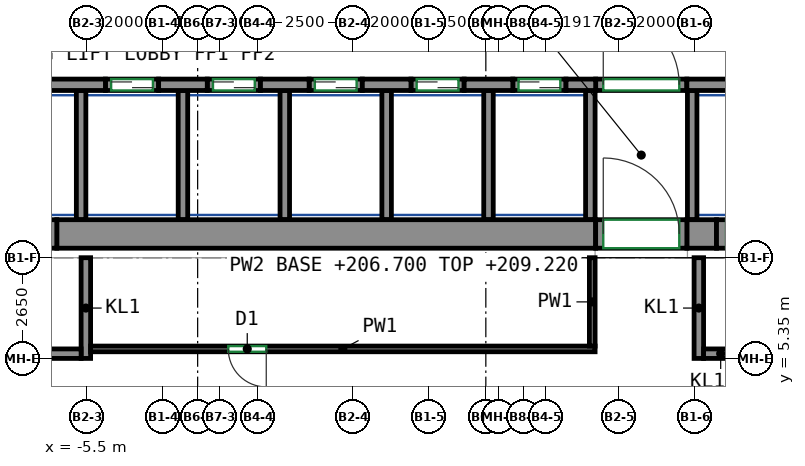
"""IFC4 building model, lengths in metres.
Left out: names, types, materials, properties, quantities, classifications, styles, units other than length and angle.
Written with IfcOpenShell. Run it as: python <this file> out.ifc"""

import sys

from ifc_helpers import new_model, si_unit, direction, frame, frame_2d, origin, place, context, subcontext, project, spatial, rectangle, extrude, source, transform, mapped, element, fill, save


model = new_model("IFC4")
c1 = context("Model", 3, precision=1e-05, world=origin(), true_north=direction((0.0, 1.0)))
c2 = subcontext(c1, "Body", "Model", "MODEL_VIEW")
j1 = project(units=[si_unit("LENGTHUNIT", "METRE"), si_unit("PLANEANGLEUNIT", "RADIAN")], contexts=[c1])
p1 = place(None, origin())
s1 = spatial("IfcSite", under=j1, at=p1, CompositionType="ELEMENT")
p2 = place(p1, origin())
s2 = spatial("IfcBuilding", under=s1, at=p2, CompositionType="ELEMENT")
p3 = place(p2, frame((0.0, 0.0, 206.7)))
s3 = spatial("IfcBuildingStorey", under=s2, at=p3, CompositionType="ELEMENT", Elevation=206.7)
m1 = source(origin(), c2, "Body", "SweptSolid", [
    extrude(rectangle(XDim=14.18, YDim=0.75, at=frame_2d((7.09, 0.0))), origin(), (0.0, 0.0, 1.0), 3.12),
])
p4 = place(p3, frame((-6.29, 8.625, 0.0), z_axis=(0.0, 0.0, 1.0), x_axis=(1.0, 0.0, 0.0)))
e1 = element("IfcWall", 1, at=p4, inside=s3, PredefinedType="SHEAR", context=c2, shape_type="MappedRepresentation", body=[
    mapped(m1, transform((0.0, 0.0, 0.0))),
])
m2 = source(origin(), c2, "Body", "SweptSolid", [
    extrude(rectangle(XDim=0.78, YDim=0.75, at=frame_2d((0.39, 0.0))), origin(), (0.0, 0.0, 1.0), 3.12),
])
p5 = place(p3, frame((10.29, 8.625, 0.0), z_axis=(0.0, 0.0, 1.0), x_axis=(1.0, 0.0, 0.0)))
e2 = element("IfcWall", 2, at=p5, inside=s3, PredefinedType="SHEAR", context=c2, shape_type="MappedRepresentation", body=[
    mapped(m2, transform((0.0, 0.0, 0.0))),
])
m3 = source(origin(), c2, "Body", "SweptSolid", [
    extrude(rectangle(XDim=6.0, YDim=0.3, at=frame_2d((3.0, 0.0))), origin(), (0.0, 0.0, 1.0), 3.12),
])
p6 = place(p3, frame((-11.01, 12.55, 0.0), z_axis=(0.0, 0.0, 1.0), x_axis=(1.0, 0.0, 0.0)))
e3 = element("IfcWall", 3, at=p6, inside=s3, PredefinedType="SHEAR", context=c2, shape_type="MappedRepresentation", body=[
    mapped(m3, transform((0.0, 0.0, 0.0))),
])
m4 = source(origin(), c2, "Body", "SweptSolid", [
    extrude(rectangle(XDim=1.28, YDim=0.3, at=frame_2d((0.64, 0.0))), origin(), (0.0, 0.0, 1.0), 3.12),
])
for number, where, z_axis, x_axis in (
    (4, (-3.61, 12.55, 0.0), (0.0, 0.0, 1.0), (1.0, 0.0, 0.0)),
    (5, (-0.93, 12.55, 0.0), (0.0, 0.0, 1.0), (1.0, 0.0, 0.0)),
    (6, (1.75, 12.55, 0.0), (0.0, 0.0, 1.0), (1.0, 0.0, 0.0)),
    (7, (4.43, 12.55, 0.0), (0.0, 0.0, 1.0), (1.0, 0.0, 0.0)),
):
    element("IfcWall", number, at=place(p3, frame(where, z_axis=z_axis, x_axis=x_axis)), inside=s3, PredefinedType="SHEAR", context=c2, shape_type="MappedRepresentation", body=[
        mapped(m4, transform((0.0, 0.0, 0.0))),
    ])
m5 = source(origin(), c2, "Body", "SweptSolid", [
    extrude(rectangle(XDim=0.78, YDim=0.3, at=frame_2d((0.39, 0.0))), origin(), (0.0, 0.0, 1.0), 3.12),
])
p7 = place(p3, frame((7.11, 12.55, 0.0), z_axis=(0.0, 0.0, 1.0), x_axis=(1.0, 0.0, 0.0)))
e8 = element("IfcWall", 8, at=p7, inside=s3, PredefinedType="SHEAR", context=c2, shape_type="MappedRepresentation", body=[
    mapped(m5, transform((0.0, 0.0, 0.0))),
])
m6 = source(origin(), c2, "Body", "SweptSolid", [
    extrude(rectangle(XDim=2.82, YDim=0.3, at=frame_2d((1.41, 0.0))), origin(), (0.0, 0.0, 1.0), 3.12),
])
p8 = place(p3, frame((10.29, 12.55, 0.0), z_axis=(0.0, 0.0, 1.0), x_axis=(1.0, 0.0, 0.0)))
e9 = element("IfcWall", 9, at=p8, inside=s3, PredefinedType="SHEAR", context=c2, shape_type="MappedRepresentation", body=[
    mapped(m6, transform((0.0, 0.0, 0.0))),
])
m7 = source(origin(), c2, "Body", "SweptSolid", [
    extrude(rectangle(XDim=1.4, YDim=0.3, at=frame_2d((0.7, 0.0))), origin(), (0.0, 0.0, 1.0), 3.12),
])
p9 = place(p3, frame((-5.01, 12.55, 0.0), z_axis=(0.0, 0.0, 1.0), x_axis=(1.0, 0.0, 0.0)))
e10 = element("IfcWall", 10, at=p9, inside=s3, PredefinedType="PARTITIONING", context=c2, shape_type="MappedRepresentation", body=[
    mapped(m7, transform((0.0, 0.0, 0.0))),
])
p10 = place(p9, frame((0.15, 0.0, 0.0)))
e11 = element("IfcOpeningElement", 11, at=p10, cuts=e10, PredefinedType="OPENING", context=c2, shape_type="SweptSolid", body=[
    extrude(rectangle(XDim=1.1, YDim=2.1, at=frame_2d((0.55, 1.05))), frame((0.0, 0.16, 0.0), z_axis=(0.0, -1.0, 0.0), x_axis=(1.0, 0.0, 0.0)), (0.0, 0.0, 1.0), 0.32),
])
m8 = source(origin(), c2, "Body", "SweptSolid", [
    extrude(rectangle(XDim=1.4, YDim=0.3, at=frame_2d((0.7, 0.0))), origin(), (0.0, 0.0, 1.0), 3.12),
])
p11 = place(p3, frame((-2.33, 12.55, 0.0), z_axis=(0.0, 0.0, 1.0), x_axis=(1.0, 0.0, 0.0)))
e12 = element("IfcWall", 12, at=p11, inside=s3, PredefinedType="PARTITIONING", context=c2, shape_type="MappedRepresentation", body=[
    mapped(m8, transform((0.0, 0.0, 0.0))),
])
p12 = place(p11, frame((0.15, 0.0, 0.0)))
e13 = element("IfcOpeningElement", 13, at=p12, cuts=e12, PredefinedType="OPENING", context=c2, shape_type="SweptSolid", body=[
    extrude(rectangle(XDim=1.1, YDim=2.1, at=frame_2d((0.55, 1.05))), frame((0.0, 0.16, 0.0), z_axis=(0.0, -1.0, 0.0), x_axis=(1.0, 0.0, 0.0)), (0.0, 0.0, 1.0), 0.32),
])
p13 = place(p3, frame((0.35, 12.55, 0.0), z_axis=(0.0, 0.0, 1.0), x_axis=(1.0, 0.0, 0.0)))
e14 = element("IfcWall", 14, at=p13, inside=s3, PredefinedType="PARTITIONING", context=c2, shape_type="MappedRepresentation", body=[
    mapped(m7, transform((0.0, 0.0, 0.0))),
])
p14 = place(p13, frame((0.15, 0.0, 0.0)))
e15 = element("IfcOpeningElement", 15, at=p14, cuts=e14, PredefinedType="OPENING", context=c2, shape_type="SweptSolid", body=[
    extrude(rectangle(XDim=1.1, YDim=2.1, at=frame_2d((0.55, 1.05))), frame((0.0, 0.16, 0.0), z_axis=(0.0, -1.0, 0.0), x_axis=(1.0, 0.0, 0.0)), (0.0, 0.0, 1.0), 0.32),
])
p15 = place(p3, frame((3.03, 12.55, 0.0), z_axis=(0.0, 0.0, 1.0), x_axis=(1.0, 0.0, 0.0)))
e16 = element("IfcWall", 16, at=p15, inside=s3, PredefinedType="PARTITIONING", context=c2, shape_type="MappedRepresentation", body=[
    mapped(m7, transform((0.0, 0.0, 0.0))),
])
p16 = place(p15, frame((0.15, 0.0, 0.0)))
e17 = element("IfcOpeningElement", 17, at=p16, cuts=e16, PredefinedType="OPENING", context=c2, shape_type="SweptSolid", body=[
    extrude(rectangle(XDim=1.1, YDim=2.1, at=frame_2d((0.55, 1.05))), frame((0.0, 0.16, 0.0), z_axis=(0.0, -1.0, 0.0), x_axis=(1.0, 0.0, 0.0)), (0.0, 0.0, 1.0), 0.32),
])
p17 = place(p3, frame((5.71, 12.55, 0.0), z_axis=(0.0, 0.0, 1.0), x_axis=(1.0, 0.0, 0.0)))
e18 = element("IfcWall", 18, at=p17, inside=s3, PredefinedType="PARTITIONING", context=c2, shape_type="MappedRepresentation", body=[
    mapped(m8, transform((0.0, 0.0, 0.0))),
])
p18 = place(p17, frame((0.15, 0.0, 0.0)))
e19 = element("IfcOpeningElement", 19, at=p18, cuts=e18, PredefinedType="OPENING", context=c2, shape_type="SweptSolid", body=[
    extrude(rectangle(XDim=1.1, YDim=2.1, at=frame_2d((0.55, 1.05))), frame((0.0, 0.16, 0.0), z_axis=(0.0, -1.0, 0.0), x_axis=(1.0, 0.0, 0.0)), (0.0, 0.0, 1.0), 0.32),
])
m9 = source(origin(), c2, "Body", "SweptSolid", [
    extrude(rectangle(XDim=2.4, YDim=0.3, at=frame_2d((1.2, 0.0))), origin(), (0.0, 0.0, 1.0), 3.12),
])
p19 = place(p3, frame((7.89, 12.55, 0.0), z_axis=(0.0, 0.0, 1.0), x_axis=(1.0, 0.0, 0.0)))
e20 = element("IfcWall", 20, at=p19, inside=s3, PredefinedType="PARTITIONING", context=c2, shape_type="MappedRepresentation", body=[
    mapped(m9, transform((0.0, 0.0, 0.0))),
])
p20 = place(p19, frame((0.2, 0.0, 0.0)))
e21 = element("IfcOpeningElement", 21, at=p20, cuts=e20, PredefinedType="OPENING", context=c2, shape_type="SweptSolid", body=[
    extrude(rectangle(XDim=2.0, YDim=2.1, at=frame_2d((1.0, 1.05))), frame((0.0, 0.16, 0.0), z_axis=(0.0, -1.0, 0.0), x_axis=(1.0, 0.0, 0.0)), (0.0, 0.0, 1.0), 0.32),
])
m10 = source(origin(), c2, "Body", "SweptSolid", [
    extrude(rectangle(XDim=2.65, YDim=0.25, at=frame_2d((1.325, 0.0))), origin(), (0.0, 0.0, 1.0), 3.12),
])
p21 = place(p3, frame((-5.525, 5.35, 0.0), z_axis=(0.0, 0.0, 1.0), x_axis=(0.0, 1.0, 0.0)))
e22 = element("IfcWall", 22, at=p21, inside=s3, PredefinedType="PARTITIONING", context=c2, shape_type="MappedRepresentation", body=[
    mapped(m10, transform((0.0, 0.0, 0.0))),
])
m11 = source(origin(), c2, "Body", "SweptSolid", [
    extrude(rectangle(XDim=5.36, YDim=0.25, at=frame_2d((2.68, 0.0))), origin(), (0.0, 0.0, 1.0), 3.12),
])
p22 = place(p3, frame((-11.01, 5.475, 0.0), z_axis=(0.0, 0.0, 1.0), x_axis=(1.0, 0.0, 0.0)))
e23 = element("IfcWall", 23, at=p22, inside=s3, PredefinedType="PARTITIONING", context=c2, shape_type="MappedRepresentation", body=[
    mapped(m11, transform((0.0, 0.0, 0.0))),
])
p23 = place(p22, frame((2.28, 0.0, 0.0)))
e24 = element("IfcOpeningElement", 24, at=p23, cuts=e23, PredefinedType="OPENING", context=c2, shape_type="SweptSolid", body=[
    extrude(rectangle(XDim=0.8, YDim=2.0, at=frame_2d((0.4, 1.0))), frame((0.0, 0.135, 0.0), z_axis=(0.0, -1.0, 0.0), x_axis=(1.0, 0.0, 0.0)), (0.0, 0.0, 1.0), 0.27),
])
p24 = place(p3, frame((10.605, 5.35, 0.0), z_axis=(0.0, 0.0, 1.0), x_axis=(0.0, 1.0, 0.0)))
e25 = element("IfcWall", 25, at=p24, inside=s3, PredefinedType="PARTITIONING", context=c2, shape_type="MappedRepresentation", body=[
    mapped(m10, transform((0.0, 0.0, 0.0))),
])
m12 = source(origin(), c2, "Body", "SweptSolid", [
    extrude(rectangle(XDim=3.0, YDim=0.25, at=frame_2d((1.5, 0.0))), origin(), (0.0, 0.0, 1.0), 3.12),
])
p25 = place(p3, frame((10.73, 5.475, 0.0), z_axis=(0.0, 0.0, 1.0), x_axis=(1.0, 0.0, 0.0)))
e26 = element("IfcWall", 26, at=p25, inside=s3, PredefinedType="PARTITIONING", context=c2, shape_type="MappedRepresentation", body=[
    mapped(m12, transform((0.0, 0.0, 0.0))),
])
p26 = place(p25, frame((1.1, 0.0, 0.0)))
e27 = element("IfcOpeningElement", 27, at=p26, cuts=e26, PredefinedType="OPENING", context=c2, shape_type="SweptSolid", body=[
    extrude(rectangle(XDim=0.8, YDim=2.0, at=frame_2d((0.4, 1.0))), frame((0.0, 0.135, 0.0), z_axis=(0.0, -1.0, 0.0), x_axis=(1.0, 0.0, 0.0)), (0.0, 0.0, 1.0), 0.27),
])
m13 = source(origin(), c2, "Body", "SweptSolid", [
    extrude(rectangle(XDim=3.4, YDim=0.25, at=frame_2d((1.7, 0.0))), origin(), (0.0, 0.0, 1.0), 3.12),
])
for number, where, z_axis, x_axis in (
    (28, (10.43, 9.0, 0.0), (0.0, 0.0, 1.0), (0.0, 1.0, 0.0)),
    (29, (2.39, 9.0, 0.0), (0.0, 0.0, 1.0), (0.0, 1.0, 0.0)),
    (30, (5.07, 9.0, 0.0), (0.0, 0.0, 1.0), (0.0, 1.0, 0.0)),
    (31, (7.75, 9.0, 0.0), (0.0, 0.0, 1.0), (0.0, 1.0, 0.0)),
    (32, (-0.29, 9.0, 0.0), (0.0, 0.0, 1.0), (0.0, 1.0, 0.0)),
    (33, (-2.97, 9.0, 0.0), (0.0, 0.0, 1.0), (0.0, 1.0, 0.0)),
    (34, (-5.65, 9.0, 0.0), (0.0, 0.0, 1.0), (0.0, 1.0, 0.0)),
):
    element("IfcWall", number, at=place(p3, frame(where, z_axis=z_axis, x_axis=x_axis)), inside=s3, PredefinedType="PARTITIONING", context=c2, shape_type="MappedRepresentation", body=[
        mapped(m13, transform((0.0, 0.0, 0.0))),
    ])
m14 = source(origin(), c2, "Body", "SweptSolid", [
    extrude(rectangle(XDim=1.4, YDim=0.75, at=frame_2d((0.7, 0.0))), origin(), (0.0, 0.0, 1.0), 2.7),
])
p27 = place(p3, frame((-7.69, 8.625, 0.0), z_axis=(0.0, 0.0, 1.0), x_axis=(1.0, 0.0, 0.0)))
e35 = element("IfcWall", 35, at=p27, inside=s3, PredefinedType="PARTITIONING", context=c2, shape_type="MappedRepresentation", body=[
    mapped(m14, transform((0.0, 0.0, 0.0))),
])
p28 = place(p27, frame((0.25, 0.0, 0.0)))
e36 = element("IfcOpeningElement", 36, at=p28, cuts=e35, PredefinedType="OPENING", context=c2, shape_type="SweptSolid", body=[
    extrude(rectangle(XDim=0.9, YDim=2.1, at=frame_2d((0.45, 1.05))), frame((0.0, 0.385, 0.0), z_axis=(0.0, -1.0, 0.0), x_axis=(1.0, 0.0, 0.0)), (0.0, 0.0, 1.0), 0.77),
])
m15 = source(origin(), c2, "Body", "SweptSolid", [
    extrude(rectangle(XDim=2.4, YDim=0.75, at=frame_2d((1.2, 0.0))), origin(), (0.0, 0.0, 1.0), 2.7),
])
p29 = place(p3, frame((7.89, 8.625, 0.0), z_axis=(0.0, 0.0, 1.0), x_axis=(1.0, 0.0, 0.0)))
e37 = element("IfcWall", 37, at=p29, inside=s3, PredefinedType="PARTITIONING", context=c2, shape_type="MappedRepresentation", body=[
    mapped(m15, transform((0.0, 0.0, 0.0))),
])
p30 = place(p29, frame((0.2, 0.0, 0.0)))
e38 = element("IfcOpeningElement", 38, at=p30, cuts=e37, PredefinedType="OPENING", context=c2, shape_type="SweptSolid", body=[
    extrude(rectangle(XDim=2.0, YDim=2.1, at=frame_2d((1.0, 1.05))), frame((0.0, 0.385, 0.0), z_axis=(0.0, -1.0, 0.0), x_axis=(1.0, 0.0, 0.0)), (0.0, 0.0, 1.0), 0.77),
])
p31 = place(p3, frame((11.07, 8.625, 0.0), z_axis=(0.0, 0.0, 1.0), x_axis=(1.0, 0.0, 0.0)))
e39 = element("IfcWall", 39, at=p31, inside=s3, PredefinedType="PARTITIONING", context=c2, shape_type="MappedRepresentation", body=[
    mapped(m14, transform((0.0, 0.0, 0.0))),
])
p32 = place(p31, frame((0.25, 0.0, 0.0)))
e40 = element("IfcOpeningElement", 40, at=p32, cuts=e39, PredefinedType="OPENING", context=c2, shape_type="SweptSolid", body=[
    extrude(rectangle(XDim=0.9, YDim=2.1, at=frame_2d((0.45, 1.05))), frame((0.0, 0.385, 0.0), z_axis=(0.0, -1.0, 0.0), x_axis=(1.0, 0.0, 0.0)), (0.0, 0.0, 1.0), 0.77),
])
p33 = place(p3, frame((7.875, 5.6, 0.0), z_axis=(0.0, 0.0, 1.0), x_axis=(-1.0, 0.0, 0.0)))
e41 = element("IfcWall", 41, at=p33, inside=s3, PredefinedType="PARTITIONING", context=c2, shape_type="SweptSolid", body=[
    extrude(rectangle(XDim=13.275, YDim=0.15, at=frame_2d((6.637, 0.0))), origin(), (0.0, 0.0, 1.0), 3.12),
])
p34 = place(p33, frame((8.653, 0.0, 0.0)))
e42 = element("IfcOpeningElement", 42, at=p34, cuts=e41, PredefinedType="OPENING", context=c2, shape_type="SweptSolid", body=[
    extrude(rectangle(XDim=1.0, YDim=2.1, at=frame_2d((0.5, 1.05))), frame((0.0, 0.085, 0.0), z_axis=(0.0, -1.0, 0.0), x_axis=(1.0, 0.0, 0.0)), (0.0, 0.0, 1.0), 0.17),
])
p35 = place(p3, frame((7.8, 8.0, 0.0), z_axis=(0.0, 0.0, 1.0), x_axis=(0.0, -1.0, 0.0)))
e43 = element("IfcWall", 43, at=p35, inside=s3, PredefinedType="PARTITIONING", context=c2, shape_type="SweptSolid", body=[
    extrude(rectangle(XDim=2.325, YDim=0.15, at=frame_2d((1.163, 0.0))), origin(), (0.0, 0.0, 1.0), 3.12),
])
p36 = place(p20, origin())
e44 = element("IfcDoor", 44, at=p36, inside=s3, OperationType="DOUBLE_DOOR_SINGLE_SWING", PredefinedType="DOOR", context=c2, shape_type="SweptSolid", body=[
    extrude(rectangle(XDim=2.0, YDim=2.1, at=frame_2d((1.0, 1.05))), frame((0.0, 0.025, 0.0), z_axis=(0.0, -1.0, 0.0), x_axis=(1.0, 0.0, 0.0)), (0.0, 0.0, 1.0), 0.05),
])
fill(e21, e44)
p37 = place(p30, origin())
e45 = element("IfcDoor", 45, at=p37, inside=s3, OperationType="DOUBLE_DOOR_SINGLE_SWING", PredefinedType="DOOR", context=c2, shape_type="SweptSolid", body=[
    extrude(rectangle(XDim=2.0, YDim=2.1, at=frame_2d((1.0, 1.05))), frame((0.0, 0.28, 0.0), z_axis=(0.0, -1.0, 0.0), x_axis=(1.0, 0.0, 0.0)), (0.0, 0.0, 1.0), 0.05),
])
fill(e38, e45)
p38 = place(p10, origin())
e46 = element("IfcDoor", 46, at=p38, inside=s3, OperationType="DOUBLE_DOOR_SLIDING", PredefinedType="DOOR", context=c2, shape_type="SweptSolid", body=[
    extrude(rectangle(XDim=1.1, YDim=2.1, at=frame_2d((0.55, 1.05))), frame((0.0, 0.025, 0.0), z_axis=(0.0, -1.0, 0.0), x_axis=(1.0, 0.0, 0.0)), (0.0, 0.0, 1.0), 0.05),
])
fill(e11, e46)
p39 = place(p12, origin())
e47 = element("IfcDoor", 47, at=p39, inside=s3, OperationType="DOUBLE_DOOR_SLIDING", PredefinedType="DOOR", context=c2, shape_type="SweptSolid", body=[
    extrude(rectangle(XDim=1.1, YDim=2.1, at=frame_2d((0.55, 1.05))), frame((0.0, 0.025, 0.0), z_axis=(0.0, -1.0, 0.0), x_axis=(1.0, 0.0, 0.0)), (0.0, 0.0, 1.0), 0.05),
])
fill(e13, e47)
p40 = place(p14, origin())
e48 = element("IfcDoor", 48, at=p40, inside=s3, OperationType="DOUBLE_DOOR_SLIDING", PredefinedType="DOOR", context=c2, shape_type="SweptSolid", body=[
    extrude(rectangle(XDim=1.1, YDim=2.1, at=frame_2d((0.55, 1.05))), frame((0.0, 0.025, 0.0), z_axis=(0.0, -1.0, 0.0), x_axis=(1.0, 0.0, 0.0)), (0.0, 0.0, 1.0), 0.05),
])
fill(e15, e48)
p41 = place(p16, origin())
e49 = element("IfcDoor", 49, at=p41, inside=s3, OperationType="DOUBLE_DOOR_SLIDING", PredefinedType="DOOR", context=c2, shape_type="SweptSolid", body=[
    extrude(rectangle(XDim=1.1, YDim=2.1, at=frame_2d((0.55, 1.05))), frame((0.0, 0.025, 0.0), z_axis=(0.0, -1.0, 0.0), x_axis=(1.0, 0.0, 0.0)), (0.0, 0.0, 1.0), 0.05),
])
fill(e17, e49)
p42 = place(p18, origin())
e50 = element("IfcDoor", 50, at=p42, inside=s3, OperationType="DOUBLE_DOOR_SLIDING", PredefinedType="DOOR", context=c2, shape_type="SweptSolid", body=[
    extrude(rectangle(XDim=1.1, YDim=2.1, at=frame_2d((0.55, 1.05))), frame((0.0, 0.025, 0.0), z_axis=(0.0, -1.0, 0.0), x_axis=(1.0, 0.0, 0.0)), (0.0, 0.0, 1.0), 0.05),
])
fill(e19, e50)
p43 = place(p34, origin())
e51 = element("IfcDoor", 51, at=p43, inside=s3, OperationType="SINGLE_SWING_LEFT", PredefinedType="DOOR", context=c2, shape_type="SweptSolid", body=[
    extrude(rectangle(XDim=1.0, YDim=2.1, at=frame_2d((0.5, 1.05))), frame((0.0, 0.025, 0.0), z_axis=(0.0, -1.0, 0.0), x_axis=(1.0, 0.0, 0.0)), (0.0, 0.0, 1.0), 0.05),
])
fill(e42, e51)
save(model, sys.argv[1])
